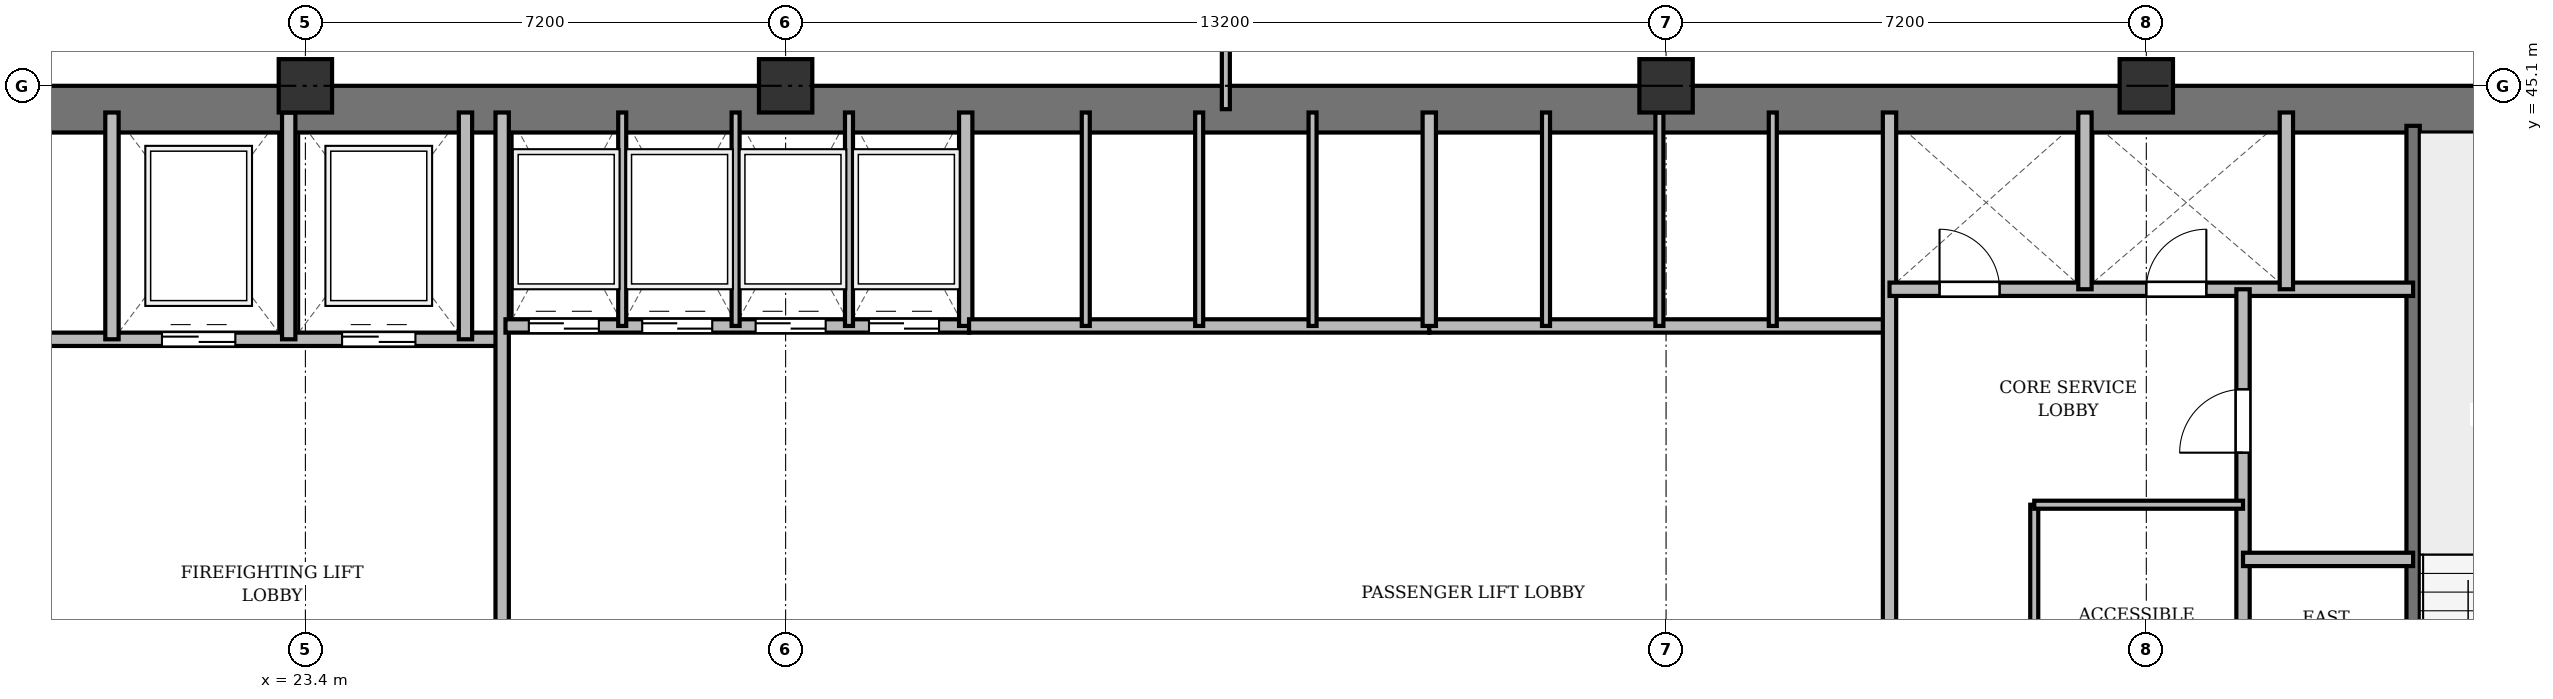
"""IFC4 building model, lengths in metres.
Left out: names, types, materials, properties, quantities, classifications, styles, units other than length and angle.
Written with IfcOpenShell. Run it as: python <this file> out.ifc"""

import sys

from ifc_helpers import new_model, si_unit, direction, frame, frame_2d, origin, origin_2d, place, context, subcontext, project, spatial, rectangle, extrude, source, transform, mapped, element, fill, save


model = new_model("IFC4")
c1 = context("Model", 3, precision=1e-05, world=origin(), true_north=direction((0.0, 1.0)))
c2 = subcontext(c1, "Body", "Model", "MODEL_VIEW")
j1 = project(units=[si_unit("LENGTHUNIT", "METRE"), si_unit("PLANEANGLEUNIT", "RADIAN")], contexts=[c1])
p1 = place(None, origin())
s1 = spatial("IfcSite", under=j1, at=p1, CompositionType="ELEMENT")
p2 = place(p1, origin())
s2 = spatial("IfcBuilding", under=s1, at=p2, CompositionType="ELEMENT")
p3 = place(p2, frame((0.0, 0.0, 117.7)))
s3 = spatial("IfcBuildingStorey", under=s2, at=p3, CompositionType="ELEMENT", Elevation=117.7)
m1 = source(origin(), c2, "Body", "SweptSolid", [
    extrude(rectangle(XDim=0.8, YDim=0.8, at=origin_2d()), origin(), (0.0, 0.0, 1.0), 3.6),
])
for number, where, z_axis, x_axis in (
    (1, (23.4, 45.1, 0.0), (0.0, 0.0, 1.0), (1.0, 0.0, 0.0)),
    (2, (30.6, 45.1, 0.0), (0.0, 0.0, 1.0), (1.0, 0.0, 0.0)),
    (3, (43.8, 45.1, 0.0), (0.0, 0.0, 1.0), (1.0, 0.0, 0.0)),
    (4, (51.0, 45.1, 0.0), (0.0, 0.0, 1.0), (1.0, 0.0, 0.0)),
):
    element("IfcColumn", number, at=place(p3, frame(where, z_axis=z_axis, x_axis=x_axis)), inside=s3, PredefinedType="COLUMN", context=c2, shape_type="MappedRepresentation", body=[
        mapped(m1, transform((0.0, 0.0, 0.0), x_axis=(1.0, 0.0, 0.0), y_axis=(0.0, 1.0, 0.0), z_axis=(0.0, 0.0, 1.0), scale=1.0)),
    ])
p4 = place(p3, frame((15.5, 44.75, 0.0), z_axis=(0.0, 0.0, 1.0), x_axis=(1.0, 0.0, 0.0)))
e5 = element("IfcWall", 5, at=p4, inside=s3, PredefinedType="SHEAR", context=c2, shape_type="SweptSolid", body=[
    extrude(rectangle(XDim=43.4, YDim=0.7, at=frame_2d((21.7, 0.0))), origin(), (0.0, 0.0, 1.0), 3.34),
])
p5 = place(p3, frame((55.0, 33.4, 0.0), z_axis=(0.0, 0.0, 1.0), x_axis=(0.0, 1.0, 0.0)))
e6 = element("IfcWall", 6, at=p5, inside=s3, PredefinedType="SHEAR", context=c2, shape_type="SweptSolid", body=[
    extrude(rectangle(XDim=11.1, YDim=0.2, at=frame_2d((5.55, 0.0))), origin(), (0.0, 0.0, 1.0), 3.34),
])
p6 = place(p5, frame((0.85, 0.0, 0.0)))
e7 = element("IfcOpeningElement", 7, at=p6, cuts=e6, PredefinedType="OPENING", context=c2, shape_type="SweptSolid", body=[
    extrude(rectangle(XDim=1.1, YDim=2.15, at=frame_2d((0.55, 1.075))), frame((0.0, 0.11, 0.0), z_axis=(0.0, -1.0, 0.0), x_axis=(1.0, 0.0, 0.0)), (0.0, 0.0, 1.0), 0.22),
])
p7 = place(p3, frame((19.55, 41.3, 0.0), z_axis=(0.0, 0.0, 1.0), x_axis=(1.0, 0.0, 0.0)))
e8 = element("IfcWall", 8, at=p7, inside=s3, PredefinedType="SOLIDWALL", context=c2, shape_type="SweptSolid", body=[
    extrude(rectangle(XDim=6.75, YDim=0.2, at=frame_2d((3.375, 0.0))), origin(), (0.0, 0.0, 1.0), 3.34),
])
p8 = place(p7, frame((1.7, 0.0, 0.0)))
e9 = element("IfcOpeningElement", 9, at=p8, cuts=e8, PredefinedType="OPENING", context=c2, shape_type="SweptSolid", body=[
    extrude(rectangle(XDim=1.1, YDim=2.15, at=frame_2d((0.55, 1.075))), frame((0.0, 0.11, 0.0), z_axis=(0.0, -1.0, 0.0), x_axis=(1.0, 0.0, 0.0)), (0.0, 0.0, 1.0), 0.22),
])
p9 = place(p7, frame((4.4, 0.0, 0.0)))
e10 = element("IfcOpeningElement", 10, at=p9, cuts=e8, PredefinedType="OPENING", context=c2, shape_type="SweptSolid", body=[
    extrude(rectangle(XDim=1.1, YDim=2.15, at=frame_2d((0.55, 1.075))), frame((0.0, 0.11, 0.0), z_axis=(0.0, -1.0, 0.0), x_axis=(1.0, 0.0, 0.0)), (0.0, 0.0, 1.0), 0.22),
])
for number, where, z_axis, x_axis in (
    (11, (20.5, 41.3, 0.0), (0.0, 0.0, 1.0), (0.0, 1.0, 0.0)),
    (12, (23.15, 41.3, 0.0), (0.0, 0.0, 1.0), (0.0, 1.0, 0.0)),
    (13, (25.8, 41.3, 0.0), (0.0, 0.0, 1.0), (0.0, 1.0, 0.0)),
):
    element("IfcWall", number, at=place(p3, frame(where, z_axis=z_axis, x_axis=x_axis)), inside=s3, PredefinedType="SOLIDWALL", context=c2, shape_type="SweptSolid", body=[
        extrude(rectangle(XDim=3.4, YDim=0.2, at=frame_2d((1.7, 0.0))), origin(), (0.0, 0.0, 1.0), 3.34),
    ])
p10 = place(p3, frame((26.35, 33.4, 0.0), z_axis=(0.0, 0.0, 1.0), x_axis=(0.0, 1.0, 0.0)))
e14 = element("IfcWall", 14, at=p10, inside=s3, PredefinedType="SOLIDWALL", context=c2, shape_type="SweptSolid", body=[
    extrude(rectangle(XDim=11.3, YDim=0.2, at=frame_2d((5.65, 0.0))), origin(), (0.0, 0.0, 1.0), 2.752),
])
p11 = place(p3, frame((26.4, 41.5, 0.0), z_axis=(0.0, 0.0, 1.0), x_axis=(1.0, 0.0, 0.0)))
e15 = element("IfcWall", 15, at=p11, inside=s3, PredefinedType="SOLIDWALL", context=c2, shape_type="SweptSolid", body=[
    extrude(rectangle(XDim=6.95, YDim=0.2, at=frame_2d((3.475, 0.0))), origin(), (0.0, 0.0, 1.0), 3.34),
])
p12 = place(p11, frame((0.35, 0.0, 0.0)))
e16 = element("IfcOpeningElement", 16, at=p12, cuts=e15, PredefinedType="OPENING", context=c2, shape_type="SweptSolid", body=[
    extrude(rectangle(XDim=1.05, YDim=2.15, at=frame_2d((0.525, 1.075))), frame((0.0, 0.11, 0.0), z_axis=(0.0, -1.0, 0.0), x_axis=(1.0, 0.0, 0.0)), (0.0, 0.0, 1.0), 0.22),
])
p13 = place(p11, frame((2.05, 0.0, 0.0)))
e17 = element("IfcOpeningElement", 17, at=p13, cuts=e15, PredefinedType="OPENING", context=c2, shape_type="SweptSolid", body=[
    extrude(rectangle(XDim=1.05, YDim=2.15, at=frame_2d((0.525, 1.075))), frame((0.0, 0.11, 0.0), z_axis=(0.0, -1.0, 0.0), x_axis=(1.0, 0.0, 0.0)), (0.0, 0.0, 1.0), 0.22),
])
p14 = place(p11, frame((3.75, 0.0, 0.0)))
e18 = element("IfcOpeningElement", 18, at=p14, cuts=e15, PredefinedType="OPENING", context=c2, shape_type="SweptSolid", body=[
    extrude(rectangle(XDim=1.05, YDim=2.15, at=frame_2d((0.525, 1.075))), frame((0.0, 0.11, 0.0), z_axis=(0.0, -1.0, 0.0), x_axis=(1.0, 0.0, 0.0)), (0.0, 0.0, 1.0), 0.22),
])
p15 = place(p11, frame((5.45, 0.0, 0.0)))
e19 = element("IfcOpeningElement", 19, at=p15, cuts=e15, PredefinedType="OPENING", context=c2, shape_type="SweptSolid", body=[
    extrude(rectangle(XDim=1.05, YDim=2.15, at=frame_2d((0.525, 1.075))), frame((0.0, 0.11, 0.0), z_axis=(0.0, -1.0, 0.0), x_axis=(1.0, 0.0, 0.0)), (0.0, 0.0, 1.0), 0.22),
])
p16 = place(p3, frame((33.3, 41.5, 0.0), z_axis=(0.0, 0.0, 1.0), x_axis=(0.0, 1.0, 0.0)))
e20 = element("IfcWall", 20, at=p16, inside=s3, PredefinedType="SOLIDWALL", context=c2, shape_type="SweptSolid", body=[
    extrude(rectangle(XDim=3.2, YDim=0.2, at=frame_2d((1.6, 0.0))), origin(), (0.0, 0.0, 1.0), 3.34),
])
for number, where, z_axis, x_axis in (
    (21, (28.15, 41.5, 0.0), (0.0, 0.0, 1.0), (0.0, 1.0, 0.0)),
    (22, (29.85, 41.5, 0.0), (0.0, 0.0, 1.0), (0.0, 1.0, 0.0)),
    (23, (31.55, 41.5, 0.0), (0.0, 0.0, 1.0), (0.0, 1.0, 0.0)),
):
    element("IfcWall", number, at=place(p3, frame(where, z_axis=z_axis, x_axis=x_axis)), inside=s3, PredefinedType="PARTITIONING", context=c2, shape_type="SweptSolid", body=[
        extrude(rectangle(XDim=3.2, YDim=0.12, at=frame_2d((1.6, 0.0))), origin(), (0.0, 0.0, 1.0), 3.34),
    ])
p17 = place(p3, frame((33.35, 41.5, 0.0), z_axis=(0.0, 0.0, 1.0), x_axis=(1.0, 0.0, 0.0)))
e24 = element("IfcWall", 24, at=p17, inside=s3, PredefinedType="SOLIDWALL", context=c2, shape_type="SweptSolid", body=[
    extrude(rectangle(XDim=6.9, YDim=0.2, at=frame_2d((3.45, 0.0))), origin(), (0.0, 0.0, 1.0), 3.34),
])
for number, where, z_axis, x_axis in (
    (25, (35.1, 41.5, 0.0), (0.0, 0.0, 1.0), (0.0, 1.0, 0.0)),
    (26, (36.8, 41.5, 0.0), (0.0, 0.0, 1.0), (0.0, 1.0, 0.0)),
    (27, (38.5, 41.5, 0.0), (0.0, 0.0, 1.0), (0.0, 1.0, 0.0)),
):
    element("IfcWall", number, at=place(p3, frame(where, z_axis=z_axis, x_axis=x_axis)), inside=s3, PredefinedType="PARTITIONING", context=c2, shape_type="SweptSolid", body=[
        extrude(rectangle(XDim=3.2, YDim=0.12, at=frame_2d((1.6, 0.0))), origin(), (0.0, 0.0, 1.0), 3.34),
    ])
p18 = place(p3, frame((40.25, 41.5, 0.0), z_axis=(0.0, 0.0, 1.0), x_axis=(1.0, 0.0, 0.0)))
e28 = element("IfcWall", 28, at=p18, inside=s3, PredefinedType="SOLIDWALL", context=c2, shape_type="SweptSolid", body=[
    extrude(rectangle(XDim=6.9, YDim=0.2, at=frame_2d((3.45, 0.0))), origin(), (0.0, 0.0, 1.0), 2.84),
])
p19 = place(p3, frame((40.25, 41.5, 0.0), z_axis=(0.0, 0.0, 1.0), x_axis=(0.0, 1.0, 0.0)))
e29 = element("IfcWall", 29, at=p19, inside=s3, PredefinedType="SOLIDWALL", context=c2, shape_type="SweptSolid", body=[
    extrude(rectangle(XDim=3.2, YDim=0.2, at=frame_2d((1.6, 0.0))), origin(), (0.0, 0.0, 1.0), 3.34),
])
p20 = place(p3, frame((42.0, 41.5, 0.0), z_axis=(0.0, 0.0, 1.0), x_axis=(0.0, 1.0, 0.0)))
e30 = element("IfcWall", 30, at=p20, inside=s3, PredefinedType="PARTITIONING", context=c2, shape_type="SweptSolid", body=[
    extrude(rectangle(XDim=3.2, YDim=0.12, at=frame_2d((1.6, 0.0))), origin(), (0.0, 0.0, 1.0), 3.34),
])
p21 = place(p3, frame((43.7, 41.5, 0.0), z_axis=(0.0, 0.0, 1.0), x_axis=(0.0, 1.0, 0.0)))
e31 = element("IfcWall", 31, at=p21, inside=s3, PredefinedType="PARTITIONING", context=c2, shape_type="SweptSolid", body=[
    extrude(rectangle(XDim=3.2, YDim=0.12, at=frame_2d((1.6, 0.0))), origin(), (0.0, 0.0, 1.0), 2.84),
])
p22 = place(p3, frame((45.4, 41.5, 0.0), z_axis=(0.0, 0.0, 1.0), x_axis=(0.0, 1.0, 0.0)))
e32 = element("IfcWall", 32, at=p22, inside=s3, PredefinedType="PARTITIONING", context=c2, shape_type="SweptSolid", body=[
    extrude(rectangle(XDim=3.2, YDim=0.12, at=frame_2d((1.6, 0.0))), origin(), (0.0, 0.0, 1.0), 3.34),
])
p23 = place(p3, frame((47.15, 33.4, 0.0), z_axis=(0.0, 0.0, 1.0), x_axis=(0.0, 1.0, 0.0)))
e33 = element("IfcWall", 33, at=p23, inside=s3, PredefinedType="SOLIDWALL", context=c2, shape_type="SweptSolid", body=[
    extrude(rectangle(XDim=11.3, YDim=0.2, at=frame_2d((5.65, 0.0))), origin(), (0.0, 0.0, 1.0), 2.752),
])
p24 = place(p3, frame((47.15, 42.05, 0.0), z_axis=(0.0, 0.0, 1.0), x_axis=(1.0, 0.0, 0.0)))
e34 = element("IfcWall", 34, at=p24, inside=s3, PredefinedType="SOLIDWALL", context=c2, shape_type="SweptSolid", body=[
    extrude(rectangle(XDim=7.85, YDim=0.2, at=frame_2d((3.925, 0.0))), origin(), (0.0, 0.0, 1.0), 2.84),
])
p25 = place(p24, frame((0.75, 0.0, 0.0)))
e35 = element("IfcOpeningElement", 35, at=p25, cuts=e34, PredefinedType="OPENING", context=c2, shape_type="SweptSolid", body=[
    extrude(rectangle(XDim=0.9, YDim=2.1, at=frame_2d((0.45, 1.05))), frame((0.0, 0.11, 0.0), z_axis=(0.0, -1.0, 0.0), x_axis=(1.0, 0.0, 0.0)), (0.0, 0.0, 1.0), 0.22),
])
p26 = place(p24, frame((3.85, 0.0, 0.0)))
e36 = element("IfcOpeningElement", 36, at=p26, cuts=e34, PredefinedType="OPENING", context=c2, shape_type="SweptSolid", body=[
    extrude(rectangle(XDim=0.9, YDim=2.1, at=frame_2d((0.45, 1.05))), frame((0.0, 0.11, 0.0), z_axis=(0.0, -1.0, 0.0), x_axis=(1.0, 0.0, 0.0)), (0.0, 0.0, 1.0), 0.22),
])
for number, where, z_axis, x_axis in (
    (37, (50.08, 42.05, 0.0), (0.0, 0.0, 1.0), (0.0, 1.0, 0.0)),
    (38, (53.1, 42.05, 0.0), (0.0, 0.0, 1.0), (0.0, 1.0, 0.0)),
):
    element("IfcWall", number, at=place(p3, frame(where, z_axis=z_axis, x_axis=x_axis)), inside=s3, PredefinedType="SOLIDWALL", context=c2, shape_type="SweptSolid", body=[
        extrude(rectangle(XDim=2.65, YDim=0.2, at=frame_2d((1.325, 0.0))), origin(), (0.0, 0.0, 1.0), 3.34),
    ])
p27 = place(p3, frame((52.45, 33.4, 0.0), z_axis=(0.0, 0.0, 1.0), x_axis=(0.0, 1.0, 0.0)))
e39 = element("IfcWall", 39, at=p27, inside=s3, PredefinedType="PARTITIONING", context=c2, shape_type="SweptSolid", body=[
    extrude(rectangle(XDim=8.65, YDim=0.2, at=frame_2d((4.325, 0.0))), origin(), (0.0, 0.0, 1.0), 2.752),
])
p28 = place(p27, frame((6.2, 0.0, 0.0)))
e40 = element("IfcOpeningElement", 40, at=p28, cuts=e39, PredefinedType="OPENING", context=c2, shape_type="SweptSolid", body=[
    extrude(rectangle(XDim=0.95, YDim=2.15, at=frame_2d((0.475, 1.075))), frame((0.0, 0.11, 0.0), z_axis=(0.0, -1.0, 0.0), x_axis=(1.0, 0.0, 0.0)), (0.0, 0.0, 1.0), 0.22),
])
p29 = place(p3, frame((52.45, 38.0, 0.0), z_axis=(0.0, 0.0, 1.0), x_axis=(1.0, 0.0, 0.0)))
e41 = element("IfcWall", 41, at=p29, inside=s3, PredefinedType="PARTITIONING", context=c2, shape_type="SweptSolid", body=[
    extrude(rectangle(XDim=2.55, YDim=0.2, at=frame_2d((1.275, 0.0))), origin(), (0.0, 0.0, 1.0), 3.34),
])
p30 = place(p3, frame((49.32, 33.4, 0.0), z_axis=(0.0, 0.0, 1.0), x_axis=(0.0, 1.0, 0.0)))
e42 = element("IfcWall", 42, at=p30, inside=s3, PredefinedType="PARTITIONING", context=c2, shape_type="SweptSolid", body=[
    extrude(rectangle(XDim=5.42, YDim=0.12, at=frame_2d((2.71, 0.0))), origin(), (0.0, 0.0, 1.0), 2.752),
])
p31 = place(p30, frame((1.6, 0.0, 0.0)))
e43 = element("IfcOpeningElement", 43, at=p31, cuts=e42, PredefinedType="OPENING", context=c2, shape_type="SweptSolid", body=[
    extrude(rectangle(XDim=0.95, YDim=2.15, at=frame_2d((0.475, 1.075))), frame((0.0, 0.07, 0.0), z_axis=(0.0, -1.0, 0.0), x_axis=(1.0, 0.0, 0.0)), (0.0, 0.0, 1.0), 0.14),
])
p32 = place(p3, frame((49.32, 38.82, 0.0), z_axis=(0.0, 0.0, 1.0), x_axis=(1.0, 0.0, 0.0)))
e44 = element("IfcWall", 44, at=p32, inside=s3, PredefinedType="PARTITIONING", context=c2, shape_type="SweptSolid", body=[
    extrude(rectangle(XDim=3.13, YDim=0.12, at=frame_2d((1.565, 0.0))), origin(), (0.0, 0.0, 1.0), 2.84),
])
p33 = place(p3, frame((37.2, 44.75, 0.0), z_axis=(0.0, 0.0, 1.0), x_axis=(0.0, 1.0, 0.0)))
e45 = element("IfcWall", 45, at=p33, inside=s3, PredefinedType="PARTITIONING", context=c2, shape_type="SweptSolid", body=[
    extrude(rectangle(XDim=3.61, YDim=0.12, at=frame_2d((1.805, 0.0))), origin(), (0.0, 0.0, 1.0), 2.752),
])
p34 = place(p33, frame((1.1, 0.0, 0.0)))
e46 = element("IfcOpeningElement", 46, at=p34, cuts=e45, PredefinedType="OPENING", context=c2, shape_type="SweptSolid", body=[
    extrude(rectangle(XDim=0.95, YDim=2.15, at=frame_2d((0.475, 1.075))), frame((0.0, 0.07, 0.0), z_axis=(0.0, -1.0, 0.0), x_axis=(1.0, 0.0, 0.0)), (0.0, 0.0, 1.0), 0.14),
])
m2 = source(origin(), c2, "Body", "SweptSolid", [
    extrude(rectangle(XDim=1.1, YDim=2.15, at=frame_2d((0.55, 1.075))), frame((0.0, 0.025, 0.0), z_axis=(0.0, -1.0, 0.0), x_axis=(1.0, 0.0, 0.0)), (0.0, 0.0, 1.0), 0.05),
])
p35 = place(p8, origin())
e47 = element("IfcDoor", 47, at=p35, inside=s3, OperationType="DOUBLE_DOOR_SLIDING", PredefinedType="DOOR", context=c2, shape_type="MappedRepresentation", body=[
    mapped(m2, transform((0.0, 0.0, 0.0), x_axis=(1.0, 0.0, 0.0), y_axis=(0.0, 1.0, 0.0), z_axis=(0.0, 0.0, 1.0), scale=1.0)),
])
fill(e9, e47)
p36 = place(p9, origin())
e48 = element("IfcDoor", 48, at=p36, inside=s3, OperationType="DOUBLE_DOOR_SLIDING", PredefinedType="DOOR", context=c2, shape_type="MappedRepresentation", body=[
    mapped(m2, transform((0.0, 0.0, 0.0), x_axis=(1.0, 0.0, 0.0), y_axis=(0.0, 1.0, 0.0), z_axis=(0.0, 0.0, 1.0), scale=1.0)),
])
fill(e10, e48)
m3 = source(origin(), c2, "Body", "SweptSolid", [
    extrude(rectangle(XDim=1.05, YDim=2.15, at=frame_2d((0.525, 1.075))), frame((0.0, 0.025, 0.0), z_axis=(0.0, -1.0, 0.0), x_axis=(1.0, 0.0, 0.0)), (0.0, 0.0, 1.0), 0.05),
])
p37 = place(p12, origin())
e49 = element("IfcDoor", 49, at=p37, inside=s3, OperationType="DOUBLE_DOOR_SLIDING", PredefinedType="DOOR", context=c2, shape_type="MappedRepresentation", body=[
    mapped(m3, transform((0.0, 0.0, 0.0), x_axis=(1.0, 0.0, 0.0), y_axis=(0.0, 1.0, 0.0), z_axis=(0.0, 0.0, 1.0), scale=1.0)),
])
fill(e16, e49)
p38 = place(p13, origin())
e50 = element("IfcDoor", 50, at=p38, inside=s3, OperationType="DOUBLE_DOOR_SLIDING", PredefinedType="DOOR", context=c2, shape_type="MappedRepresentation", body=[
    mapped(m3, transform((0.0, 0.0, 0.0), x_axis=(1.0, 0.0, 0.0), y_axis=(0.0, 1.0, 0.0), z_axis=(0.0, 0.0, 1.0), scale=1.0)),
])
fill(e17, e50)
p39 = place(p14, origin())
e51 = element("IfcDoor", 51, at=p39, inside=s3, OperationType="DOUBLE_DOOR_SLIDING", PredefinedType="DOOR", context=c2, shape_type="MappedRepresentation", body=[
    mapped(m3, transform((0.0, 0.0, 0.0), x_axis=(1.0, 0.0, 0.0), y_axis=(0.0, 1.0, 0.0), z_axis=(0.0, 0.0, 1.0), scale=1.0)),
])
fill(e18, e51)
p40 = place(p15, origin())
e52 = element("IfcDoor", 52, at=p40, inside=s3, OperationType="DOUBLE_DOOR_SLIDING", PredefinedType="DOOR", context=c2, shape_type="MappedRepresentation", body=[
    mapped(m3, transform((0.0, 0.0, 0.0), x_axis=(1.0, 0.0, 0.0), y_axis=(0.0, 1.0, 0.0), z_axis=(0.0, 0.0, 1.0), scale=1.0)),
])
fill(e19, e52)
m4 = source(origin(), c2, "Body", "SweptSolid", [
    extrude(rectangle(XDim=0.9, YDim=2.1, at=frame_2d((0.45, 1.05))), frame((0.0, 0.025, 0.0), z_axis=(0.0, -1.0, 0.0), x_axis=(1.0, 0.0, 0.0)), (0.0, 0.0, 1.0), 0.05),
])
p41 = place(p25, origin())
e53 = element("IfcDoor", 53, at=p41, inside=s3, OperationType="SINGLE_SWING_LEFT", PredefinedType="DOOR", context=c2, shape_type="MappedRepresentation", body=[
    mapped(m4, transform((0.0, 0.0, 0.0), x_axis=(1.0, 0.0, 0.0), y_axis=(0.0, 1.0, 0.0), z_axis=(0.0, 0.0, 1.0), scale=1.0)),
])
fill(e35, e53)
p42 = place(p26, origin())
e54 = element("IfcDoor", 54, at=p42, inside=s3, OperationType="SINGLE_SWING_RIGHT", PredefinedType="DOOR", context=c2, shape_type="MappedRepresentation", body=[
    mapped(m4, transform((0.0, 0.0, 0.0), x_axis=(1.0, 0.0, 0.0), y_axis=(0.0, 1.0, 0.0), z_axis=(0.0, 0.0, 1.0), scale=1.0)),
])
fill(e36, e54)
m5 = source(origin(), c2, "Body", "SweptSolid", [
    extrude(rectangle(XDim=0.95, YDim=2.15, at=frame_2d((0.475, 1.075))), frame((0.0, 0.025, 0.0), z_axis=(0.0, -1.0, 0.0), x_axis=(1.0, 0.0, 0.0)), (0.0, 0.0, 1.0), 0.05),
])
p43 = place(p28, origin())
e55 = element("IfcDoor", 55, at=p43, inside=s3, OperationType="SINGLE_SWING_LEFT", PredefinedType="DOOR", context=c2, shape_type="MappedRepresentation", body=[
    mapped(m5, transform((0.0, 0.0, 0.0), x_axis=(1.0, 0.0, 0.0), y_axis=(0.0, 1.0, 0.0), z_axis=(0.0, 0.0, 1.0), scale=1.0)),
])
fill(e40, e55)
save(model, sys.argv[1])
